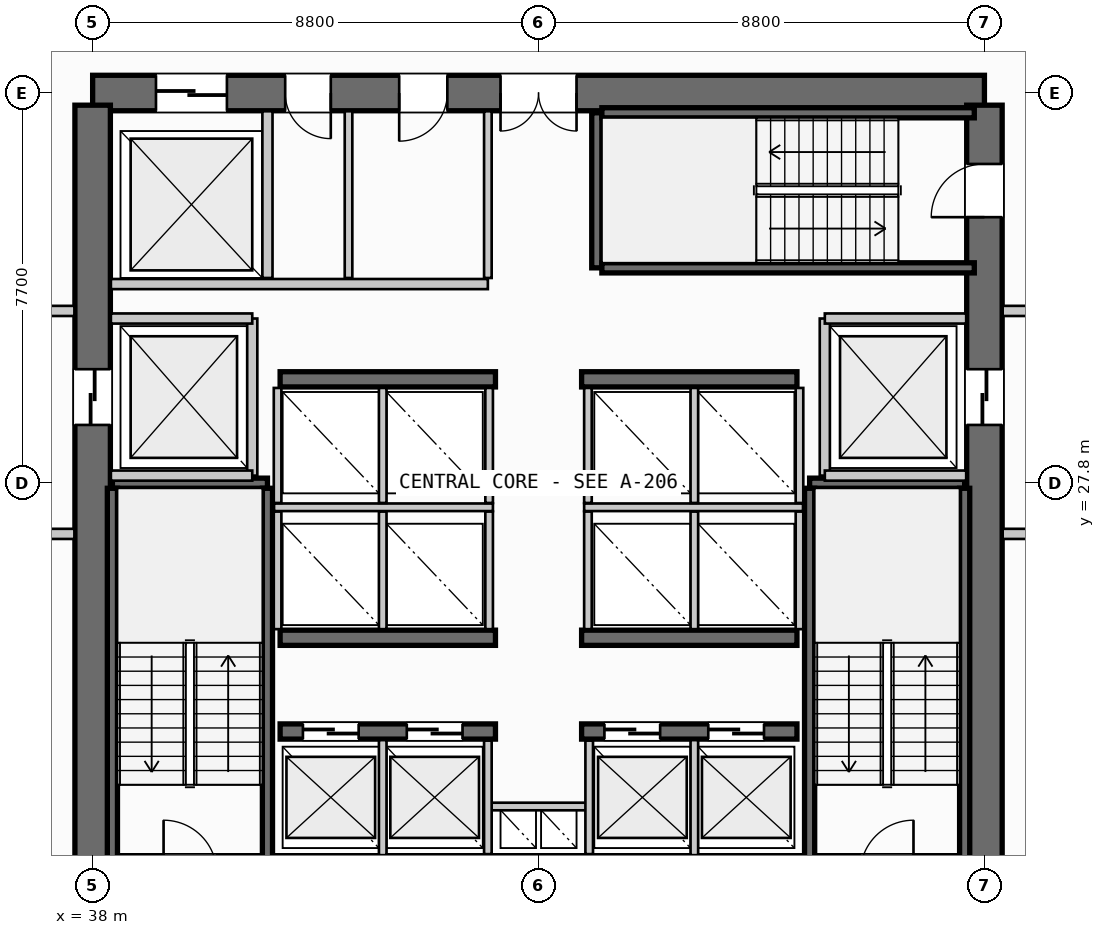
"""IFC4 building model, lengths in metres.
Left out: names, types, materials, properties, quantities, classifications, styles, units other than length and angle.
Written with IfcOpenShell. Run it as: python <this file> out.ifc"""

import sys

from ifc_helpers import new_model, si_unit, direction, frame, frame_2d, origin, place, context, subcontext, project, spatial, rectangle, extrude, source, transform, mapped, element, fill, save


model = new_model("IFC4")
c1 = context("Model", 3, precision=1e-05, world=origin(), true_north=direction((0.0, 1.0)))
c2 = subcontext(c1, "Body", "Model", "MODEL_VIEW")
j1 = project(units=[si_unit("LENGTHUNIT", "METRE"), si_unit("PLANEANGLEUNIT", "RADIAN")], contexts=[c1])
p1 = place(None, origin())
s1 = spatial("IfcSite", under=j1, at=p1, CompositionType="ELEMENT")
p2 = place(p1, origin())
s2 = spatial("IfcBuilding", under=s1, at=p2, CompositionType="ELEMENT")
p3 = place(p2, frame((0.0, 0.0, 37.2)))
s3 = spatial("IfcBuildingStorey", under=s2, at=p3, CompositionType="ELEMENT", Elevation=37.2)
p4 = place(p3, frame((38.0, 20.1, 0.0), z_axis=(0.0, 0.0, 1.0), x_axis=(1.0, 0.0, 0.0)))
e1 = element("IfcWall", 1, at=p4, inside=s3, PredefinedType="SHEAR", context=c2, shape_type="SweptSolid", body=[
    extrude(rectangle(XDim=17.6, YDim=0.7, at=frame_2d((8.8, 0.0))), origin(), (0.0, 0.0, 1.0), 3.55),
])
p5 = place(p4, frame((1.4, 0.0, 0.0)))
e2 = element("IfcOpeningElement", 2, at=p5, cuts=e1, PredefinedType="OPENING", context=c2, shape_type="SweptSolid", body=[
    extrude(rectangle(XDim=1.05, YDim=2.15, at=frame_2d((0.525, 1.075))), frame((0.0, 0.36, 0.0), z_axis=(0.0, -1.0, 0.0), x_axis=(1.0, 0.0, 0.0)), (0.0, 0.0, 1.0), 0.72),
])
p6 = place(p4, frame((15.15, 0.0, 0.0)))
e3 = element("IfcOpeningElement", 3, at=p6, cuts=e1, PredefinedType="OPENING", context=c2, shape_type="SweptSolid", body=[
    extrude(rectangle(XDim=1.05, YDim=2.15, at=frame_2d((0.525, 1.075))), frame((0.0, 0.36, 0.0), z_axis=(0.0, -1.0, 0.0), x_axis=(1.0, 0.0, 0.0)), (0.0, 0.0, 1.0), 0.72),
])
p7 = place(p3, frame((55.6, 35.5, 0.0), z_axis=(0.0, 0.0, 1.0), x_axis=(-1.0, 0.0, 0.0)))
e4 = element("IfcWall", 4, at=p7, inside=s3, PredefinedType="SHEAR", context=c2, shape_type="SweptSolid", body=[
    extrude(rectangle(XDim=17.6, YDim=0.7, at=frame_2d((8.8, 0.0))), origin(), (0.0, 0.0, 1.0), 3.55),
])
p8 = place(p7, frame((8.05, 0.0, 0.0)))
e5 = element("IfcOpeningElement", 5, at=p8, cuts=e4, PredefinedType="OPENING", context=c2, shape_type="SweptSolid", body=[
    extrude(rectangle(XDim=1.5, YDim=2.2, at=frame_2d((0.75, 1.1))), frame((0.0, 0.36, 0.0), z_axis=(0.0, -1.0, 0.0), x_axis=(1.0, 0.0, 0.0)), (0.0, 0.0, 1.0), 0.72),
])
p9 = place(p7, frame((14.95, 0.0, 0.0)))
e6 = element("IfcOpeningElement", 6, at=p9, cuts=e4, PredefinedType="OPENING", context=c2, shape_type="SweptSolid", body=[
    extrude(rectangle(XDim=1.4, YDim=2.3, at=frame_2d((0.7, 1.15))), frame((0.0, 0.36, 0.0), z_axis=(0.0, -1.0, 0.0), x_axis=(1.0, 0.0, 0.0)), (0.0, 0.0, 1.0), 0.72),
])
p10 = place(p7, frame((12.9, 0.0, 0.0)))
e7 = element("IfcOpeningElement", 7, at=p10, cuts=e4, PredefinedType="OPENING", context=c2, shape_type="SweptSolid", body=[
    extrude(rectangle(XDim=0.9, YDim=2.15, at=frame_2d((0.45, 1.075))), frame((0.0, 0.36, 0.0), z_axis=(0.0, -1.0, 0.0), x_axis=(1.0, 0.0, 0.0)), (0.0, 0.0, 1.0), 0.72),
])
p11 = place(p7, frame((10.6, 0.0, 0.0)))
e8 = element("IfcOpeningElement", 8, at=p11, cuts=e4, PredefinedType="OPENING", context=c2, shape_type="SweptSolid", body=[
    extrude(rectangle(XDim=0.95, YDim=2.15, at=frame_2d((0.475, 1.075))), frame((0.0, 0.36, 0.0), z_axis=(0.0, -1.0, 0.0), x_axis=(1.0, 0.0, 0.0)), (0.0, 0.0, 1.0), 0.72),
])
p12 = place(p3, frame((38.0, 35.26, 0.0), z_axis=(0.0, 0.0, 1.0), x_axis=(0.0, -1.0, 0.0)))
e9 = element("IfcWall", 9, at=p12, inside=s3, PredefinedType="SHEAR", context=c2, shape_type="SweptSolid", body=[
    extrude(rectangle(XDim=14.92, YDim=0.7, at=frame_2d((7.46, 0.0))), origin(), (0.0, 0.0, 1.0), 3.55),
])
p13 = place(p12, frame((5.21, 0.0, 0.0)))
e10 = element("IfcOpeningElement", 10, at=p13, cuts=e9, PredefinedType="OPENING", context=c2, shape_type="SweptSolid", body=[
    extrude(rectangle(XDim=1.1, YDim=2.2, at=frame_2d((0.55, 1.1))), frame((0.0, 0.36, 0.0), z_axis=(0.0, -1.0, 0.0), x_axis=(1.0, 0.0, 0.0)), (0.0, 0.0, 1.0), 0.72),
])
p14 = place(p3, frame((55.6, 20.34, 0.0), z_axis=(0.0, 0.0, 1.0), x_axis=(0.0, 1.0, 0.0)))
e11 = element("IfcWall", 11, at=p14, inside=s3, PredefinedType="SHEAR", context=c2, shape_type="SweptSolid", body=[
    extrude(rectangle(XDim=14.92, YDim=0.7, at=frame_2d((7.46, 0.0))), origin(), (0.0, 0.0, 1.0), 3.55),
])
p15 = place(p14, frame((12.71, 0.0, 0.0)))
e12 = element("IfcOpeningElement", 12, at=p15, cuts=e11, PredefinedType="OPENING", context=c2, shape_type="SweptSolid", body=[
    extrude(rectangle(XDim=1.05, YDim=2.15, at=frame_2d((0.525, 1.075))), frame((0.0, 0.36, 0.0), z_axis=(0.0, -1.0, 0.0), x_axis=(1.0, 0.0, 0.0)), (0.0, 0.0, 1.0), 0.72),
])
p16 = place(p14, frame((8.61, 0.0, 0.0)))
e13 = element("IfcOpeningElement", 13, at=p16, cuts=e11, PredefinedType="OPENING", context=c2, shape_type="SweptSolid", body=[
    extrude(rectangle(XDim=1.1, YDim=2.2, at=frame_2d((0.55, 1.1))), frame((0.0, 0.36, 0.0), z_axis=(0.0, -1.0, 0.0), x_axis=(1.0, 0.0, 0.0)), (0.0, 0.0, 1.0), 0.72),
])
p17 = place(p3, frame((41.7, 22.9, 0.0), z_axis=(0.0, 0.0, 1.0), x_axis=(1.0, 0.0, 0.0)))
e14 = element("IfcWall", 14, at=p17, inside=s3, PredefinedType="SHEAR", context=c2, shape_type="SweptSolid", body=[
    extrude(rectangle(XDim=4.25, YDim=0.3, at=frame_2d((2.125, 0.0))), origin(), (0.0, 0.0, 1.0), 3.55),
])
p18 = place(p17, frame((0.45, 0.0, 0.0)))
e15 = element("IfcOpeningElement", 15, at=p18, cuts=e14, PredefinedType="OPENING", context=c2, shape_type="SweptSolid", body=[
    extrude(rectangle(XDim=1.1, YDim=2.2, at=frame_2d((0.55, 1.1))), frame((0.0, 0.16, 0.0), z_axis=(0.0, -1.0, 0.0), x_axis=(1.0, 0.0, 0.0)), (0.0, 0.0, 1.0), 0.32),
])
p19 = place(p17, frame((2.5, 0.0, 0.0)))
e16 = element("IfcOpeningElement", 16, at=p19, cuts=e14, PredefinedType="OPENING", context=c2, shape_type="SweptSolid", body=[
    extrude(rectangle(XDim=1.1, YDim=2.2, at=frame_2d((0.55, 1.1))), frame((0.0, 0.16, 0.0), z_axis=(0.0, -1.0, 0.0), x_axis=(1.0, 0.0, 0.0)), (0.0, 0.0, 1.0), 0.32),
])
p20 = place(p3, frame((47.65, 22.9, 0.0), z_axis=(0.0, 0.0, 1.0), x_axis=(1.0, 0.0, 0.0)))
e17 = element("IfcWall", 17, at=p20, inside=s3, PredefinedType="SHEAR", context=c2, shape_type="SweptSolid", body=[
    extrude(rectangle(XDim=4.25, YDim=0.3, at=frame_2d((2.125, 0.0))), origin(), (0.0, 0.0, 1.0), 3.55),
])
p21 = place(p20, frame((0.45, 0.0, 0.0)))
e18 = element("IfcOpeningElement", 18, at=p21, cuts=e17, PredefinedType="OPENING", context=c2, shape_type="SweptSolid", body=[
    extrude(rectangle(XDim=1.1, YDim=2.2, at=frame_2d((0.55, 1.1))), frame((0.0, 0.16, 0.0), z_axis=(0.0, -1.0, 0.0), x_axis=(1.0, 0.0, 0.0)), (0.0, 0.0, 1.0), 0.32),
])
p22 = place(p20, frame((2.5, 0.0, 0.0)))
e19 = element("IfcOpeningElement", 19, at=p22, cuts=e17, PredefinedType="OPENING", context=c2, shape_type="SweptSolid", body=[
    extrude(rectangle(XDim=1.1, YDim=2.2, at=frame_2d((0.55, 1.1))), frame((0.0, 0.16, 0.0), z_axis=(0.0, -1.0, 0.0), x_axis=(1.0, 0.0, 0.0)), (0.0, 0.0, 1.0), 0.32),
])
for number, where, z_axis, x_axis in (
    (20, (41.7, 24.75, 0.0), (0.0, 0.0, 1.0), (1.0, 0.0, 0.0)),
    (21, (47.65, 24.75, 0.0), (0.0, 0.0, 1.0), (1.0, 0.0, 0.0)),
    (22, (41.7, 29.85, 0.0), (0.0, 0.0, 1.0), (1.0, 0.0, 0.0)),
    (23, (47.65, 29.85, 0.0), (0.0, 0.0, 1.0), (1.0, 0.0, 0.0)),
):
    element("IfcWall", number, at=place(p3, frame(where, z_axis=z_axis, x_axis=x_axis)), inside=s3, PredefinedType="SHEAR", context=c2, shape_type="SweptSolid", body=[
        extrude(rectangle(XDim=4.25, YDim=0.3, at=frame_2d((2.125, 0.0))), origin(), (0.0, 0.0, 1.0), 3.55),
    ])
p23 = place(p3, frame((38.39, 27.8, 0.0), z_axis=(0.0, 0.0, 1.0), x_axis=(1.0, 0.0, 0.0)))
e24 = element("IfcWall", 24, at=p23, inside=s3, PredefinedType="SHEAR", context=c2, shape_type="SweptSolid", body=[
    extrude(rectangle(XDim=3.06, YDim=0.2, at=frame_2d((1.53, 0.0))), origin(), (0.0, 0.0, 1.0), 3.55),
])
for number, where, z_axis, x_axis in (
    (25, (41.45, 27.7, 0.0), (0.0, 0.0, 1.0), (0.0, -1.0, 0.0)),
    (26, (38.39, 20.35, 0.0), (0.0, 0.0, 1.0), (0.0, 1.0, 0.0)),
):
    element("IfcWall", number, at=place(p3, frame(where, z_axis=z_axis, x_axis=x_axis)), inside=s3, PredefinedType="SHEAR", context=c2, shape_type="SweptSolid", body=[
        extrude(rectangle(XDim=7.35, YDim=0.2, at=frame_2d((3.675, 0.0))), origin(), (0.0, 0.0, 1.0), 3.55),
    ])
p24 = place(p3, frame((52.15, 27.8, 0.0), z_axis=(0.0, 0.0, 1.0), x_axis=(1.0, 0.0, 0.0)))
e27 = element("IfcWall", 27, at=p24, inside=s3, PredefinedType="SHEAR", context=c2, shape_type="SweptSolid", body=[
    extrude(rectangle(XDim=3.06, YDim=0.2, at=frame_2d((1.53, 0.0))), origin(), (0.0, 0.0, 1.0), 3.55),
])
for number, where, z_axis, x_axis in (
    (28, (55.21, 27.7, 0.0), (0.0, 0.0, 1.0), (0.0, -1.0, 0.0)),
    (29, (52.15, 20.35, 0.0), (0.0, 0.0, 1.0), (0.0, 1.0, 0.0)),
):
    element("IfcWall", number, at=place(p3, frame(where, z_axis=z_axis, x_axis=x_axis)), inside=s3, PredefinedType="SHEAR", context=c2, shape_type="SweptSolid", body=[
        extrude(rectangle(XDim=7.35, YDim=0.2, at=frame_2d((3.675, 0.0))), origin(), (0.0, 0.0, 1.0), 3.55),
    ])
p25 = place(p3, frame((47.95, 32.05, 0.0), z_axis=(0.0, 0.0, 1.0), x_axis=(0.0, 1.0, 0.0)))
e30 = element("IfcWall", 30, at=p25, inside=s3, PredefinedType="SHEAR", context=c2, shape_type="SweptSolid", body=[
    extrude(rectangle(XDim=3.06, YDim=0.2, at=frame_2d((1.53, 0.0))), origin(), (0.0, 0.0, 1.0), 3.55),
])
for number, where, z_axis, x_axis in (
    (31, (48.05, 35.11, 0.0), (0.0, 0.0, 1.0), (1.0, 0.0, 0.0)),
    (32, (55.4, 32.05, 0.0), (0.0, 0.0, 1.0), (-1.0, 0.0, 0.0)),
):
    element("IfcWall", number, at=place(p3, frame(where, z_axis=z_axis, x_axis=x_axis)), inside=s3, PredefinedType="SHEAR", context=c2, shape_type="SweptSolid", body=[
        extrude(rectangle(XDim=7.35, YDim=0.2, at=frame_2d((3.675, 0.0))), origin(), (0.0, 0.0, 1.0), 3.55),
    ])
p26 = place(p3, frame((45.8, 21.42, 0.0), z_axis=(0.0, 0.0, 1.0), x_axis=(1.0, 0.0, 0.0)))
e33 = element("IfcWall", 33, at=p26, inside=s3, PredefinedType="PARTITIONING", context=c2, shape_type="SweptSolid", body=[
    extrude(rectangle(XDim=2.0, YDim=0.15, at=frame_2d((1.0, 0.0))), origin(), (0.0, 0.0, 1.0), 2.925),
])
for number, where, z_axis, x_axis in (
    (34, (45.8, 20.48, 0.0), (0.0, 0.0, 1.0), (0.0, 1.0, 0.0)),
    (35, (47.8, 20.48, 0.0), (0.0, 0.0, 1.0), (0.0, 1.0, 0.0)),
):
    element("IfcWall", number, at=place(p3, frame(where, z_axis=z_axis, x_axis=x_axis)), inside=s3, PredefinedType="PARTITIONING", context=c2, shape_type="SweptSolid", body=[
        extrude(rectangle(XDim=2.24, YDim=0.15, at=frame_2d((1.12, 0.0))), origin(), (0.0, 0.0, 1.0), 2.925),
    ])
p27 = place(p3, frame((41.15, 27.95, 0.0), z_axis=(0.0, 0.0, 1.0), x_axis=(0.0, 1.0, 0.0)))
e36 = element("IfcWall", 36, at=p27, inside=s3, PredefinedType="PARTITIONING", context=c2, shape_type="SweptSolid", body=[
    extrude(rectangle(XDim=3.1, YDim=0.2, at=frame_2d((1.55, 0.0))), origin(), (0.0, 0.0, 1.0), 2.925),
])
for number, where, z_axis, x_axis in (
    (37, (38.36, 27.95, 0.0), (0.0, 0.0, 1.0), (1.0, 0.0, 0.0)),
    (38, (38.36, 31.05, 0.0), (0.0, 0.0, 1.0), (1.0, 0.0, 0.0)),
):
    element("IfcWall", number, at=place(p3, frame(where, z_axis=z_axis, x_axis=x_axis)), inside=s3, PredefinedType="PARTITIONING", context=c2, shape_type="SweptSolid", body=[
        extrude(rectangle(XDim=2.79, YDim=0.2, at=frame_2d((1.395, 0.0))), origin(), (0.0, 0.0, 1.0), 2.925),
    ])
for number, where, z_axis, x_axis in (
    (39, (34.5, 26.8, 0.0), (0.0, 0.0, 1.0), (1.0, 0.0, 0.0)),
    (40, (34.5, 31.2, 0.0), (0.0, 0.0, 1.0), (1.0, 0.0, 0.0)),
):
    element("IfcWall", number, at=place(p3, frame(where, z_axis=z_axis, x_axis=x_axis)), inside=s3, PredefinedType="PARTITIONING", context=c2, shape_type="SweptSolid", body=[
        extrude(rectangle(XDim=3.14, YDim=0.2, at=frame_2d((1.57, 0.0))), origin(), (0.0, 0.0, 1.0), 2.925),
    ])
p28 = place(p3, frame((52.45, 27.95, 0.0), z_axis=(0.0, 0.0, 1.0), x_axis=(0.0, 1.0, 0.0)))
e41 = element("IfcWall", 41, at=p28, inside=s3, PredefinedType="PARTITIONING", context=c2, shape_type="SweptSolid", body=[
    extrude(rectangle(XDim=3.1, YDim=0.2, at=frame_2d((1.55, 0.0))), origin(), (0.0, 0.0, 1.0), 2.925),
])
for number, where, z_axis, x_axis in (
    (42, (52.45, 27.95, 0.0), (0.0, 0.0, 1.0), (1.0, 0.0, 0.0)),
    (43, (52.45, 31.05, 0.0), (0.0, 0.0, 1.0), (1.0, 0.0, 0.0)),
):
    element("IfcWall", number, at=place(p3, frame(where, z_axis=z_axis, x_axis=x_axis)), inside=s3, PredefinedType="PARTITIONING", context=c2, shape_type="SweptSolid", body=[
        extrude(rectangle(XDim=2.79, YDim=0.2, at=frame_2d((1.395, 0.0))), origin(), (0.0, 0.0, 1.0), 2.925),
    ])
for number, where, z_axis, x_axis in (
    (44, (55.96, 26.8, 0.0), (0.0, 0.0, 1.0), (1.0, 0.0, 0.0)),
    (45, (55.96, 31.2, 0.0), (0.0, 0.0, 1.0), (1.0, 0.0, 0.0)),
):
    element("IfcWall", number, at=place(p3, frame(where, z_axis=z_axis, x_axis=x_axis)), inside=s3, PredefinedType="PARTITIONING", context=c2, shape_type="SweptSolid", body=[
        extrude(rectangle(XDim=3.14, YDim=0.2, at=frame_2d((1.57, 0.0))), origin(), (0.0, 0.0, 1.0), 2.925),
    ])
for number, where, z_axis, x_axis in (
    (46, (43.725, 20.46, 0.0), (0.0, 0.0, 1.0), (0.0, 1.0, 0.0)),
    (47, (49.875, 20.46, 0.0), (0.0, 0.0, 1.0), (0.0, 1.0, 0.0)),
):
    element("IfcWall", number, at=place(p3, frame(where, z_axis=z_axis, x_axis=x_axis)), inside=s3, PredefinedType="PARTITIONING", context=c2, shape_type="SweptSolid", body=[
        extrude(rectangle(XDim=2.27, YDim=0.15, at=frame_2d((1.135, 0.0))), origin(), (0.0, 0.0, 1.0), 2.925),
    ])
p29 = place(p3, frame((41.58, 27.325, 0.0), z_axis=(0.0, 0.0, 1.0), x_axis=(1.0, 0.0, 0.0)))
e48 = element("IfcWall", 48, at=p29, inside=s3, PredefinedType="PARTITIONING", context=c2, shape_type="SweptSolid", body=[
    extrude(rectangle(XDim=4.32, YDim=0.15, at=frame_2d((2.16, 0.0))), origin(), (0.0, 0.0, 1.0), 2.925),
])
p30 = place(p3, frame((47.7, 27.325, 0.0), z_axis=(0.0, 0.0, 1.0), x_axis=(1.0, 0.0, 0.0)))
e49 = element("IfcWall", 49, at=p30, inside=s3, PredefinedType="PARTITIONING", context=c2, shape_type="SweptSolid", body=[
    extrude(rectangle(XDim=4.32, YDim=0.15, at=frame_2d((2.16, 0.0))), origin(), (0.0, 0.0, 1.0), 2.925),
])
for number, where, z_axis, x_axis in (
    (50, (41.65, 24.92, 0.0), (0.0, 0.0, 1.0), (0.0, 1.0, 0.0)),
    (51, (43.725, 24.92, 0.0), (0.0, 0.0, 1.0), (0.0, 1.0, 0.0)),
    (52, (45.825, 24.92, 0.0), (0.0, 0.0, 1.0), (0.0, 1.0, 0.0)),
    (53, (47.775, 24.92, 0.0), (0.0, 0.0, 1.0), (0.0, 1.0, 0.0)),
    (54, (49.875, 24.92, 0.0), (0.0, 0.0, 1.0), (0.0, 1.0, 0.0)),
    (55, (51.95, 24.92, 0.0), (0.0, 0.0, 1.0), (0.0, 1.0, 0.0)),
):
    element("IfcWall", number, at=place(p3, frame(where, z_axis=z_axis, x_axis=x_axis)), inside=s3, PredefinedType="PARTITIONING", context=c2, shape_type="SweptSolid", body=[
        extrude(rectangle(XDim=2.32, YDim=0.15, at=frame_2d((1.16, 0.0))), origin(), (0.0, 0.0, 1.0), 2.925),
    ])
for number, where, z_axis, x_axis in (
    (56, (41.65, 27.41, 0.0), (0.0, 0.0, 1.0), (0.0, 1.0, 0.0)),
    (57, (43.725, 27.41, 0.0), (0.0, 0.0, 1.0), (0.0, 1.0, 0.0)),
    (58, (45.825, 27.41, 0.0), (0.0, 0.0, 1.0), (0.0, 1.0, 0.0)),
    (59, (47.775, 27.41, 0.0), (0.0, 0.0, 1.0), (0.0, 1.0, 0.0)),
    (60, (49.875, 27.41, 0.0), (0.0, 0.0, 1.0), (0.0, 1.0, 0.0)),
    (61, (51.95, 27.41, 0.0), (0.0, 0.0, 1.0), (0.0, 1.0, 0.0)),
):
    element("IfcWall", number, at=place(p3, frame(where, z_axis=z_axis, x_axis=x_axis)), inside=s3, PredefinedType="PARTITIONING", context=c2, shape_type="SweptSolid", body=[
        extrude(rectangle(XDim=2.27, YDim=0.15, at=frame_2d((1.135, 0.0))), origin(), (0.0, 0.0, 1.0), 2.925),
    ])
p31 = place(p3, frame((41.45, 31.85, 0.0), z_axis=(0.0, 0.0, 1.0), x_axis=(0.0, 1.0, 0.0)))
e62 = element("IfcWall", 62, at=p31, inside=s3, PredefinedType="PARTITIONING", context=c2, shape_type="SweptSolid", body=[
    extrude(rectangle(XDim=3.29, YDim=0.2, at=frame_2d((1.645, 0.0))), origin(), (0.0, 0.0, 1.0), 2.925),
])
p32 = place(p3, frame((38.36, 31.73, 0.0), z_axis=(0.0, 0.0, 1.0), x_axis=(1.0, 0.0, 0.0)))
e63 = element("IfcWall", 63, at=p32, inside=s3, PredefinedType="PARTITIONING", context=c2, shape_type="SweptSolid", body=[
    extrude(rectangle(XDim=7.44, YDim=0.2, at=frame_2d((3.72, 0.0))), origin(), (0.0, 0.0, 1.0), 2.925),
])
p33 = place(p3, frame((45.8, 31.85, 0.0), z_axis=(0.0, 0.0, 1.0), x_axis=(0.0, 1.0, 0.0)))
e64 = element("IfcWall", 64, at=p33, inside=s3, PredefinedType="PARTITIONING", context=c2, shape_type="SweptSolid", body=[
    extrude(rectangle(XDim=3.29, YDim=0.15, at=frame_2d((1.645, 0.0))), origin(), (0.0, 0.0, 1.0), 2.925),
])
p34 = place(p3, frame((43.05, 31.85, 0.0), z_axis=(0.0, 0.0, 1.0), x_axis=(0.0, 1.0, 0.0)))
e65 = element("IfcWall", 65, at=p34, inside=s3, PredefinedType="PLUMBINGWALL", context=c2, shape_type="SweptSolid", body=[
    extrude(rectangle(XDim=3.29, YDim=0.15, at=frame_2d((1.645, 0.0))), origin(), (0.0, 0.0, 1.0), 2.925),
])
m1 = source(origin(), c2, "Body", "SweptSolid", [
    extrude(rectangle(XDim=1.05, YDim=2.15, at=frame_2d((0.525, 1.075))), frame((0.0, 0.025, 0.0), z_axis=(0.0, -1.0, 0.0), x_axis=(1.0, 0.0, 0.0)), (0.0, 0.0, 1.0), 0.05),
])
p35 = place(p15, origin())
e66 = element("IfcDoor", 66, at=p35, inside=s3, OperationType="SINGLE_SWING_LEFT", PredefinedType="DOOR", context=c2, shape_type="MappedRepresentation", body=[
    mapped(m1, transform((0.0, 0.0, 0.0), scale=1.0)),
])
fill(e12, e66)
m2 = source(origin(), c2, "Body", "SweptSolid", [
    extrude(rectangle(XDim=1.5, YDim=2.2, at=frame_2d((0.75, 1.1))), frame((0.0, 0.025, 0.0), z_axis=(0.0, -1.0, 0.0), x_axis=(1.0, 0.0, 0.0)), (0.0, 0.0, 1.0), 0.05),
])
p36 = place(p8, origin())
e67 = element("IfcDoor", 67, at=p36, inside=s3, OperationType="DOUBLE_DOOR_SINGLE_SWING", PredefinedType="DOOR", context=c2, shape_type="MappedRepresentation", body=[
    mapped(m2, transform((0.0, 0.0, 0.0), scale=1.0)),
])
fill(e5, e67)
m3 = source(origin(), c2, "Body", "SweptSolid", [
    extrude(rectangle(XDim=1.1, YDim=2.2, at=frame_2d((0.55, 1.1))), frame((0.0, 0.025, 0.0), z_axis=(0.0, -1.0, 0.0), x_axis=(1.0, 0.0, 0.0)), (0.0, 0.0, 1.0), 0.05),
])
p37 = place(p13, origin())
e68 = element("IfcDoor", 68, at=p37, inside=s3, OperationType="SLIDING_TO_LEFT", PredefinedType="DOOR", context=c2, shape_type="MappedRepresentation", body=[
    mapped(m3, transform((0.0, 0.0, 0.0), scale=1.0)),
])
fill(e10, e68)
p38 = place(p16, origin())
e69 = element("IfcDoor", 69, at=p38, inside=s3, OperationType="SLIDING_TO_RIGHT", PredefinedType="DOOR", context=c2, shape_type="MappedRepresentation", body=[
    mapped(m3, transform((0.0, 0.0, 0.0), scale=1.0)),
])
fill(e13, e69)
p39 = place(p18, origin())
e70 = element("IfcDoor", 70, at=p39, inside=s3, OperationType="SLIDING_TO_LEFT", PredefinedType="DOOR", context=c2, shape_type="MappedRepresentation", body=[
    mapped(m3, transform((0.0, 0.0, 0.0), scale=1.0)),
])
fill(e15, e70)
p40 = place(p19, origin())
e71 = element("IfcDoor", 71, at=p40, inside=s3, OperationType="SLIDING_TO_LEFT", PredefinedType="DOOR", context=c2, shape_type="MappedRepresentation", body=[
    mapped(m3, transform((0.0, 0.0, 0.0), scale=1.0)),
])
fill(e16, e71)
p41 = place(p21, origin())
e72 = element("IfcDoor", 72, at=p41, inside=s3, OperationType="SLIDING_TO_LEFT", PredefinedType="DOOR", context=c2, shape_type="MappedRepresentation", body=[
    mapped(m3, transform((0.0, 0.0, 0.0), scale=1.0)),
])
fill(e18, e72)
p42 = place(p22, origin())
e73 = element("IfcDoor", 73, at=p42, inside=s3, OperationType="SLIDING_TO_LEFT", PredefinedType="DOOR", context=c2, shape_type="MappedRepresentation", body=[
    mapped(m3, transform((0.0, 0.0, 0.0), scale=1.0)),
])
fill(e19, e73)
m4 = source(origin(), c2, "Body", "SweptSolid", [
    extrude(rectangle(XDim=1.4, YDim=2.3, at=frame_2d((0.7, 1.15))), frame((0.0, 0.025, 0.0), z_axis=(0.0, -1.0, 0.0), x_axis=(1.0, 0.0, 0.0)), (0.0, 0.0, 1.0), 0.05),
])
p43 = place(p9, origin())
e74 = element("IfcDoor", 74, at=p43, inside=s3, OperationType="SLIDING_TO_RIGHT", PredefinedType="DOOR", context=c2, shape_type="MappedRepresentation", body=[
    mapped(m4, transform((0.0, 0.0, 0.0), scale=1.0)),
])
fill(e6, e74)
m5 = source(origin(), c2, "Body", "SweptSolid", [
    extrude(rectangle(XDim=0.9, YDim=2.15, at=frame_2d((0.45, 1.075))), frame((0.0, 0.025, 0.0), z_axis=(0.0, -1.0, 0.0), x_axis=(1.0, 0.0, 0.0)), (0.0, 0.0, 1.0), 0.05),
])
p44 = place(p10, origin())
e75 = element("IfcDoor", 75, at=p44, inside=s3, OperationType="SINGLE_SWING_LEFT", PredefinedType="DOOR", context=c2, shape_type="MappedRepresentation", body=[
    mapped(m5, transform((0.0, 0.0, 0.0), scale=1.0)),
])
fill(e7, e75)
m6 = source(origin(), c2, "Body", "SweptSolid", [
    extrude(rectangle(XDim=0.95, YDim=2.15, at=frame_2d((0.475, 1.075))), frame((0.0, 0.025, 0.0), z_axis=(0.0, -1.0, 0.0), x_axis=(1.0, 0.0, 0.0)), (0.0, 0.0, 1.0), 0.05),
])
p45 = place(p11, origin())
e76 = element("IfcDoor", 76, at=p45, inside=s3, OperationType="SINGLE_SWING_RIGHT", PredefinedType="DOOR", context=c2, shape_type="MappedRepresentation", body=[
    mapped(m6, transform((0.0, 0.0, 0.0), scale=1.0)),
])
fill(e8, e76)
save(model, sys.argv[1])
